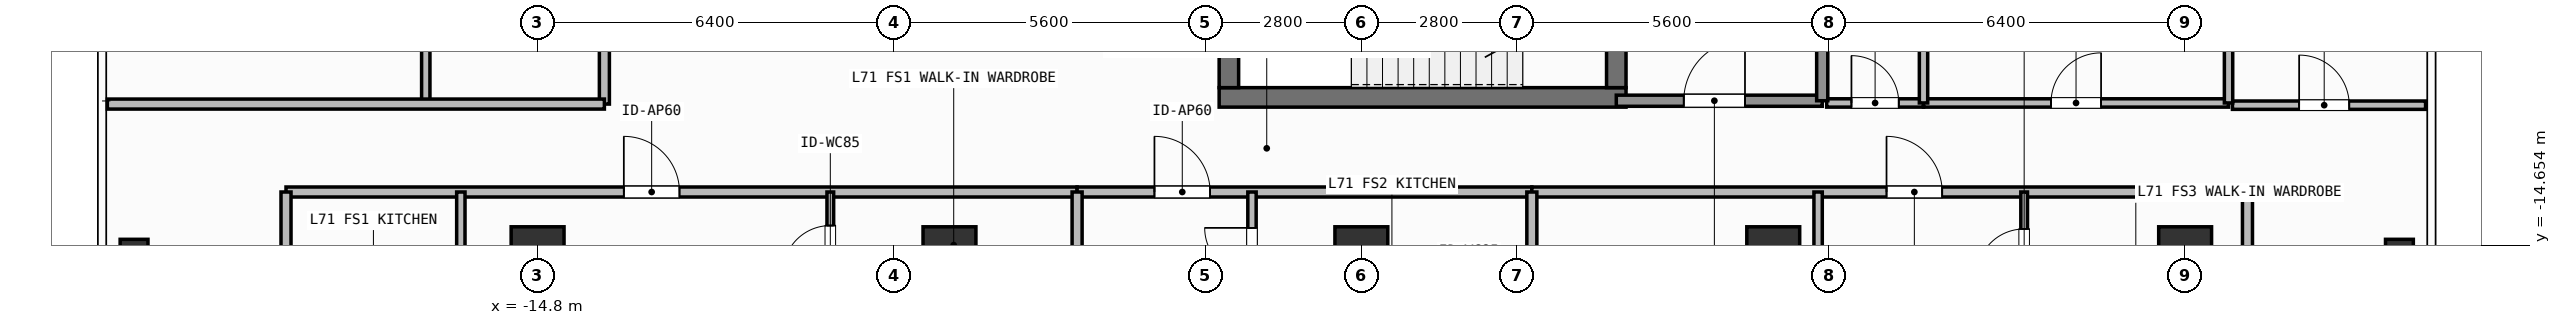
"""IFC4 building model, lengths in metres.
Left out: names, types, materials, properties, quantities, classifications, styles, units other than length and angle.
Written with IfcOpenShell. Run it as: python <this file> out.ifc"""

import sys

from ifc_helpers import new_model, si_unit, direction, frame, frame_2d, origin, origin_2d, place, context, subcontext, project, spatial, rectangle, hollow_rectangle, extrude, element, fill, save


model = new_model("IFC4")
c1 = context("Model", 3, precision=1e-05, world=origin(), true_north=direction((0.0, 1.0)))
c2 = subcontext(c1, "Body", "Model", "MODEL_VIEW")
j1 = project(units=[si_unit("LENGTHUNIT", "METRE"), si_unit("PLANEANGLEUNIT", "RADIAN")], contexts=[c1])
p1 = place(None, origin())
s1 = spatial("IfcSite", under=j1, at=p1, CompositionType="ELEMENT")
p2 = place(p1, origin())
s2 = spatial("IfcBuilding", under=s1, at=p2, CompositionType="ELEMENT")
p3 = place(p2, frame((0.0, 0.0, 289.8)))
s3 = spatial("IfcBuildingStorey", under=s2, at=p3, CompositionType="ELEMENT", Elevation=289.8)
p4 = place(p3, frame((-2.555, -12.0, 0.0), z_axis=(0.0, 0.0, 1.0), x_axis=(1.0, 0.0, 0.0)))
e1 = element("IfcWall", 1, at=p4, inside=s3, PredefinedType="SHEAR", context=c2, shape_type="SweptSolid", body=[
    extrude(rectangle(XDim=7.31, YDim=0.35, at=frame_2d((3.655, 0.0))), origin(), (0.0, 0.0, 1.0), 3.9),
])
p5 = place(p3, frame((-2.38, -11.825, 0.0), z_axis=(0.0, 0.0, 1.0), x_axis=(0.0, 1.0, 0.0)))
e2 = element("IfcWall", 2, at=p5, inside=s3, PredefinedType="SHEAR", context=c2, shape_type="SweptSolid", body=[
    extrude(rectangle(XDim=2.925, YDim=0.35, at=frame_2d((1.462, 0.0))), origin(), (0.0, 0.0, 1.0), 3.9),
])
p6 = place(p3, frame((4.58, -8.9, 0.0), z_axis=(0.0, 0.0, 1.0), x_axis=(0.0, -1.0, 0.0)))
e3 = element("IfcWall", 3, at=p6, inside=s3, PredefinedType="SHEAR", context=c2, shape_type="SweptSolid", body=[
    extrude(rectangle(XDim=2.925, YDim=0.35, at=frame_2d((1.462, 0.0))), origin(), (0.0, 0.0, 1.0), 3.9),
])
p7 = place(p6, frame((0.913, 0.0, 0.0)))
e4 = element("IfcOpeningElement", 4, at=p7, cuts=e3, PredefinedType="OPENING", context=c2, shape_type="SweptSolid", body=[
    extrude(rectangle(XDim=1.1, YDim=2.15, at=frame_2d((0.55, 1.075))), frame((0.0, 0.185, 0.0), z_axis=(0.0, -1.0, 0.0), x_axis=(1.0, 0.0, 0.0)), (0.0, 0.0, 1.0), 0.37),
])
for number, where, z_axis, x_axis in (
    (5, (-14.8, -14.8, 0.0), (0.0, 0.0, 1.0), (1.0, 0.0, 0.0)),
    (6, (-7.4, -14.8, 0.0), (0.0, 0.0, 1.0), (1.0, 0.0, 0.0)),
    (7, (0.0, -14.8, 0.0), (0.0, 0.0, 1.0), (1.0, 0.0, 0.0)),
    (8, (7.4, -14.8, 0.0), (0.0, 0.0, 1.0), (1.0, 0.0, 0.0)),
    (9, (14.8, -14.8, 0.0), (0.0, 0.0, 1.0), (1.0, 0.0, 0.0)),
):
    element("IfcColumn", number, at=place(p3, frame(where, z_axis=z_axis, x_axis=x_axis)), inside=s3, PredefinedType="COLUMN", context=c2, shape_type="SweptSolid", body=[
        extrude(rectangle(XDim=0.95, YDim=0.95, at=origin_2d()), origin(), (0.0, 0.0, 1.0), 3.9),
    ])
for number, where, z_axis, x_axis in (
    (10, (-22.05, -14.8, 0.0), (0.0, 0.0, 1.0), (1.0, 0.0, 0.0)),
    (11, (18.65, -14.8, 0.0), (0.0, 0.0, 1.0), (1.0, 0.0, 0.0)),
):
    element("IfcColumn", number, at=place(p3, frame(where, z_axis=z_axis, x_axis=x_axis)), inside=s3, PredefinedType="COLUMN", context=c2, shape_type="SweptSolid", body=[
        extrude(hollow_rectangle(XDim=0.5, YDim=0.5, WallThickness=0.025, at=origin_2d()), origin(), (0.0, 0.0, 1.0), 3.9),
    ])
p8 = place(p3, frame((4.58, -12.06, 0.0), z_axis=(0.0, 0.0, 1.0), x_axis=(1.0, 0.0, 0.0)))
e12 = element("IfcWall", 12, at=p8, inside=s3, PredefinedType="SOLIDWALL", context=c2, shape_type="SweptSolid", body=[
    extrude(rectangle(XDim=3.7, YDim=0.2, at=frame_2d((1.85, 0.0))), origin(), (0.0, 0.0, 1.0), 3.68),
])
p9 = place(p8, frame((1.212, 0.0, 0.0)))
e13 = element("IfcOpeningElement", 13, at=p9, cuts=e12, PredefinedType="OPENING", context=c2, shape_type="SweptSolid", body=[
    extrude(rectangle(XDim=1.1, YDim=2.15, at=frame_2d((0.55, 1.075))), frame((0.0, 0.11, 0.0), z_axis=(0.0, -1.0, 0.0), x_axis=(1.0, 0.0, 0.0)), (0.0, 0.0, 1.0), 0.22),
])
p10 = place(p3, frame((8.36, -12.1, 0.0), z_axis=(0.0, 0.0, 1.0), x_axis=(1.0, 0.0, 0.0)))
e14 = element("IfcWall", 14, at=p10, inside=s3, PredefinedType="PARTITIONING", context=c2, shape_type="SweptSolid", body=[
    extrude(rectangle(XDim=1.74, YDim=0.15, at=frame_2d((0.87, 0.0))), origin(), (0.0, 0.0, 1.0), 3.68),
])
p11 = place(p10, frame((0.445, 0.0, 0.0)))
e15 = element("IfcOpeningElement", 15, at=p11, cuts=e14, PredefinedType="OPENING", context=c2, shape_type="SweptSolid", body=[
    extrude(rectangle(XDim=0.85, YDim=2.1, at=frame_2d((0.425, 1.05))), frame((0.0, 0.085, 0.0), z_axis=(0.0, -1.0, 0.0), x_axis=(1.0, 0.0, 0.0)), (0.0, 0.0, 1.0), 0.17),
])
p12 = place(p3, frame((10.1, -12.1, 0.0), z_axis=(0.0, 0.0, 1.0), x_axis=(1.0, 0.0, 0.0)))
e16 = element("IfcWall", 16, at=p12, inside=s3, PredefinedType="PARTITIONING", context=c2, shape_type="SweptSolid", body=[
    extrude(rectangle(XDim=5.48, YDim=0.15, at=frame_2d((2.74, 0.0))), origin(), (0.0, 0.0, 1.0), 3.68),
])
p13 = place(p12, frame((2.29, 0.0, 0.0)))
e17 = element("IfcOpeningElement", 17, at=p13, cuts=e16, PredefinedType="OPENING", context=c2, shape_type="SweptSolid", body=[
    extrude(rectangle(XDim=0.9, YDim=2.1, at=frame_2d((0.45, 1.05))), frame((0.0, 0.085, 0.0), z_axis=(0.0, -1.0, 0.0), x_axis=(1.0, 0.0, 0.0)), (0.0, 0.0, 1.0), 0.17),
])
p14 = place(p3, frame((-19.32, -13.7, 0.0), z_axis=(0.0, 0.0, 1.0), x_axis=(1.0, 0.0, 0.0)))
e18 = element("IfcWall", 18, at=p14, inside=s3, PredefinedType="PARTITIONING", context=c2, shape_type="SweptSolid", body=[
    extrude(rectangle(XDim=14.213, YDim=0.18, at=frame_2d((7.106, 0.0))), origin(), (0.0, 0.0, 1.0), 3.68),
])
p15 = place(p14, frame((6.069, 0.0, 0.0)))
e19 = element("IfcOpeningElement", 19, at=p15, cuts=e18, PredefinedType="OPENING", context=c2, shape_type="SweptSolid", body=[
    extrude(rectangle(XDim=1.0, YDim=2.2, at=frame_2d((0.5, 1.1))), frame((0.0, 0.1, 0.0), z_axis=(0.0, -1.0, 0.0), x_axis=(1.0, 0.0, 0.0)), (0.0, 0.0, 1.0), 0.2),
])
p16 = place(p3, frame((-16.179, -17.108, 0.0), z_axis=(0.0, 0.0, 1.0), x_axis=(0.0, 1.0, 0.0)))
e20 = element("IfcWall", 20, at=p16, inside=s3, PredefinedType="PARTITIONING", context=c2, shape_type="SweptSolid", body=[
    extrude(rectangle(XDim=3.408, YDim=0.15, at=frame_2d((1.704, 0.0))), origin(), (0.0, 0.0, 1.0), 3.68),
])
p17 = place(p16, frame((0.849, 0.0, 0.0)))
e21 = element("IfcOpeningElement", 21, at=p17, cuts=e20, PredefinedType="OPENING", context=c2, shape_type="SweptSolid", body=[
    extrude(rectangle(XDim=0.85, YDim=2.1, at=frame_2d((0.425, 1.05))), frame((0.0, 0.085, 0.0), z_axis=(0.0, -1.0, 0.0), x_axis=(1.0, 0.0, 0.0)), (0.0, 0.0, 1.0), 0.17),
])
p18 = place(p3, frame((-9.541, -15.608, 0.0), z_axis=(0.0, 0.0, 1.0), x_axis=(0.0, 1.0, 0.0)))
e22 = element("IfcWall", 22, at=p18, inside=s3, PredefinedType="PARTITIONING", context=c2, shape_type="SweptSolid", body=[
    extrude(rectangle(XDim=1.908, YDim=0.12, at=frame_2d((0.954, 0.0))), origin(), (0.0, 0.0, 1.0), 3.68),
])
p19 = place(p18, frame((0.455, 0.0, 0.0)))
e23 = element("IfcOpeningElement", 23, at=p19, cuts=e22, PredefinedType="OPENING", context=c2, shape_type="SweptSolid", body=[
    extrude(rectangle(XDim=0.85, YDim=2.1, at=frame_2d((0.425, 1.05))), frame((0.0, 0.07, 0.0), z_axis=(0.0, -1.0, 0.0), x_axis=(1.0, 0.0, 0.0)), (0.0, 0.0, 1.0), 0.14),
])
p20 = place(p3, frame((-5.107, -13.7, 0.0), z_axis=(0.0, 0.0, 1.0), x_axis=(1.0, 0.0, 0.0)))
e24 = element("IfcWall", 24, at=p20, inside=s3, PredefinedType="PARTITIONING", context=c2, shape_type="SweptSolid", body=[
    extrude(rectangle(XDim=8.17, YDim=0.18, at=frame_2d((4.085, 0.0))), origin(), (0.0, 0.0, 1.0), 3.68),
])
p21 = place(p20, frame((1.389, 0.0, 0.0)))
e25 = element("IfcOpeningElement", 25, at=p21, cuts=e24, PredefinedType="OPENING", context=c2, shape_type="SweptSolid", body=[
    extrude(rectangle(XDim=1.0, YDim=2.2, at=frame_2d((0.5, 1.1))), frame((0.0, 0.1, 0.0), z_axis=(0.0, -1.0, 0.0), x_axis=(1.0, 0.0, 0.0)), (0.0, 0.0, 1.0), 0.2),
])
p22 = place(p3, frame((-1.965, -15.839, 0.0), z_axis=(0.0, 0.0, 1.0), x_axis=(0.0, 1.0, 0.0)))
e26 = element("IfcWall", 26, at=p22, inside=s3, PredefinedType="PARTITIONING", context=c2, shape_type="SweptSolid", body=[
    extrude(rectangle(XDim=2.139, YDim=0.15, at=frame_2d((1.07, 0.0))), origin(), (0.0, 0.0, 1.0), 3.68),
])
p23 = place(p22, frame((0.645, 0.0, 0.0)))
e27 = element("IfcOpeningElement", 27, at=p23, cuts=e26, PredefinedType="OPENING", context=c2, shape_type="SweptSolid", body=[
    extrude(rectangle(XDim=0.85, YDim=2.1, at=frame_2d((0.425, 1.05))), frame((0.0, 0.085, 0.0), z_axis=(0.0, -1.0, 0.0), x_axis=(1.0, 0.0, 0.0)), (0.0, 0.0, 1.0), 0.17),
])
p24 = place(p3, frame((3.063, -13.7, 0.0), z_axis=(0.0, 0.0, 1.0), x_axis=(1.0, 0.0, 0.0)))
e28 = element("IfcWall", 28, at=p24, inside=s3, PredefinedType="PARTITIONING", context=c2, shape_type="SweptSolid", body=[
    extrude(rectangle(XDim=12.857, YDim=0.18, at=frame_2d((6.428, 0.0))), origin(), (0.0, 0.0, 1.0), 3.68),
])
p25 = place(p24, frame((6.372, 0.0, 0.0)))
e29 = element("IfcOpeningElement", 29, at=p25, cuts=e28, PredefinedType="OPENING", context=c2, shape_type="SweptSolid", body=[
    extrude(rectangle(XDim=1.0, YDim=2.2, at=frame_2d((0.5, 1.1))), frame((0.0, 0.1, 0.0), z_axis=(0.0, -1.0, 0.0), x_axis=(1.0, 0.0, 0.0)), (0.0, 0.0, 1.0), 0.2),
])
p26 = place(p3, frame((8.206, -17.59, 0.0), z_axis=(0.0, 0.0, 1.0), x_axis=(0.0, 1.0, 0.0)))
e30 = element("IfcWall", 30, at=p26, inside=s3, PredefinedType="PARTITIONING", context=c2, shape_type="SweptSolid", body=[
    extrude(rectangle(XDim=3.89, YDim=0.15, at=frame_2d((1.945, 0.0))), origin(), (0.0, 0.0, 1.0), 3.68),
])
p27 = place(p26, frame((1.35, 0.0, 0.0)))
e31 = element("IfcOpeningElement", 31, at=p27, cuts=e30, PredefinedType="OPENING", context=c2, shape_type="SweptSolid", body=[
    extrude(rectangle(XDim=0.85, YDim=2.1, at=frame_2d((0.425, 1.05))), frame((0.0, 0.085, 0.0), z_axis=(0.0, -1.0, 0.0), x_axis=(1.0, 0.0, 0.0)), (0.0, 0.0, 1.0), 0.17),
])
p28 = place(p3, frame((11.908, -15.878, 0.0), z_axis=(0.0, 0.0, 1.0), x_axis=(0.0, 1.0, 0.0)))
e32 = element("IfcWall", 32, at=p28, inside=s3, PredefinedType="PARTITIONING", context=c2, shape_type="SweptSolid", body=[
    extrude(rectangle(XDim=2.178, YDim=0.12, at=frame_2d((1.089, 0.0))), origin(), (0.0, 0.0, 1.0), 3.68),
])
p29 = place(p28, frame((0.664, 0.0, 0.0)))
e33 = element("IfcOpeningElement", 33, at=p29, cuts=e32, PredefinedType="OPENING", context=c2, shape_type="SweptSolid", body=[
    extrude(rectangle(XDim=0.85, YDim=2.1, at=frame_2d((0.425, 1.05))), frame((0.0, 0.07, 0.0), z_axis=(0.0, -1.0, 0.0), x_axis=(1.0, 0.0, 0.0)), (0.0, 0.0, 1.0), 0.14),
])
p30 = place(p3, frame((-13.6, -12.12, 0.0), z_axis=(0.0, 0.0, 1.0), x_axis=(0.0, 1.0, 0.0)))
e34 = element("IfcWall", 34, at=p30, inside=s3, PredefinedType="PARTITIONING", context=c2, shape_type="SweptSolid", body=[
    extrude(rectangle(XDim=10.956, YDim=0.18, at=frame_2d((5.478, 0.0))), origin(), (0.0, 0.0, 1.0), 3.68),
])
p31 = place(p30, frame((5.335, 0.0, 0.0)))
e35 = element("IfcOpeningElement", 35, at=p31, cuts=e34, PredefinedType="OPENING", context=c2, shape_type="SweptSolid", body=[
    extrude(rectangle(XDim=1.0, YDim=2.2, at=frame_2d((0.5, 1.1))), frame((0.0, 0.1, 0.0), z_axis=(0.0, -1.0, 0.0), x_axis=(1.0, 0.0, 0.0)), (0.0, 0.0, 1.0), 0.2),
])
p32 = place(p3, frame((15.65, -12.14, 0.0), z_axis=(0.0, 0.0, 1.0), x_axis=(1.0, 0.0, 0.0)))
e36 = element("IfcWall", 36, at=p32, inside=s3, PredefinedType="PARTITIONING", context=c2, shape_type="SweptSolid", body=[
    extrude(rectangle(XDim=3.47, YDim=0.15, at=frame_2d((1.735, 0.0))), origin(), (0.0, 0.0, 1.0), 3.68),
])
p33 = place(p32, frame((1.198, 0.0, 0.0)))
e37 = element("IfcOpeningElement", 37, at=p33, cuts=e36, PredefinedType="OPENING", context=c2, shape_type="SweptSolid", body=[
    extrude(rectangle(XDim=0.9, YDim=2.1, at=frame_2d((0.45, 1.05))), frame((0.0, 0.085, 0.0), z_axis=(0.0, -1.0, 0.0), x_axis=(1.0, 0.0, 0.0)), (0.0, 0.0, 1.0), 0.17),
])
p34 = place(p3, frame((8.28, -12.06, 0.0), z_axis=(0.0, 0.0, 1.0), x_axis=(0.0, 1.0, 0.0)))
e38 = element("IfcWall", 38, at=p34, inside=s3, PredefinedType="SOLIDWALL", context=c2, shape_type="SweptSolid", body=[
    extrude(rectangle(XDim=3.335, YDim=0.2, at=frame_2d((1.667, 0.0))), origin(), (0.0, 0.0, 1.0), 3.68),
])
p35 = place(p3, frame((10.1, -12.1, 0.0), z_axis=(0.0, 0.0, 1.0), x_axis=(0.0, 1.0, 0.0)))
e39 = element("IfcWall", 39, at=p35, inside=s3, PredefinedType="PARTITIONING", context=c2, shape_type="SweptSolid", body=[
    extrude(rectangle(XDim=2.35, YDim=0.15, at=frame_2d((1.175, 0.0))), origin(), (0.0, 0.0, 1.0), 3.68),
])
p36 = place(p3, frame((15.58, -12.1, 0.0), z_axis=(0.0, 0.0, 1.0), x_axis=(0.0, 1.0, 0.0)))
e40 = element("IfcWall", 40, at=p36, inside=s3, PredefinedType="PARTITIONING", context=c2, shape_type="SweptSolid", body=[
    extrude(rectangle(XDim=6.25, YDim=0.15, at=frame_2d((3.125, 0.0))), origin(), (0.0, 0.0, 1.0), 3.68),
])
for number, where, z_axis, x_axis in (
    (41, (-19.32, -19.51, 0.0), (0.0, 0.0, 1.0), (0.0, 1.0, 0.0)),
    (42, (15.92, -19.51, 0.0), (0.0, 0.0, 1.0), (0.0, 1.0, 0.0)),
):
    element("IfcWall", number, at=place(p3, frame(where, z_axis=z_axis, x_axis=x_axis)), inside=s3, PredefinedType="PARTITIONING", context=c2, shape_type="SweptSolid", body=[
        extrude(rectangle(XDim=5.81, YDim=0.18, at=frame_2d((2.905, 0.0))), origin(), (0.0, 0.0, 1.0), 3.68),
    ])
for number, where, z_axis, x_axis in (
    (43, (-5.107, -20.63, 0.0), (0.0, 0.0, 1.0), (0.0, 1.0, 0.0)),
    (44, (3.063, -20.63, 0.0), (0.0, 0.0, 1.0), (0.0, 1.0, 0.0)),
):
    element("IfcWall", number, at=place(p3, frame(where, z_axis=z_axis, x_axis=x_axis)), inside=s3, PredefinedType="PARTITIONING", context=c2, shape_type="SweptSolid", body=[
        extrude(rectangle(XDim=6.93, YDim=0.18, at=frame_2d((3.465, 0.0))), origin(), (0.0, 0.0, 1.0), 3.68),
    ])
p37 = place(p3, frame((-16.809, -12.12, 0.0), z_axis=(0.0, 0.0, 1.0), x_axis=(0.0, 1.0, 0.0)))
e45 = element("IfcWall", 45, at=p37, inside=s3, PredefinedType="PARTITIONING", context=c2, shape_type="SweptSolid", body=[
    extrude(rectangle(XDim=2.8, YDim=0.15, at=frame_2d((1.4, 0.0))), origin(), (0.0, 0.0, 1.0), 3.68),
])
p38 = place(p3, frame((-22.53, -12.12, 0.0), z_axis=(0.0, 0.0, 1.0), x_axis=(1.0, 0.0, 0.0)))
e46 = element("IfcWall", 46, at=p38, inside=s3, PredefinedType="PARTITIONING", context=c2, shape_type="SweptSolid", body=[
    extrude(rectangle(XDim=8.93, YDim=0.18, at=frame_2d((4.465, 0.0))), origin(), (0.0, 0.0, 1.0), 3.68),
])
p39 = place(p9, origin())
e47 = element("IfcDoor", 47, at=p39, inside=s3, OperationType="SINGLE_SWING_RIGHT", PredefinedType="DOOR", context=c2, shape_type="SweptSolid", body=[
    extrude(rectangle(XDim=1.1, YDim=2.15, at=frame_2d((0.55, 1.075))), frame((0.0, 0.025, 0.0), z_axis=(0.0, -1.0, 0.0), x_axis=(1.0, 0.0, 0.0)), (0.0, 0.0, 1.0), 0.05),
])
fill(e13, e47)
p40 = place(p11, origin())
e48 = element("IfcDoor", 48, at=p40, inside=s3, OperationType="SINGLE_SWING_LEFT", PredefinedType="DOOR", context=c2, shape_type="SweptSolid", body=[
    extrude(rectangle(XDim=0.85, YDim=2.1, at=frame_2d((0.425, 1.05))), frame((0.0, 0.025, 0.0), z_axis=(0.0, -1.0, 0.0), x_axis=(1.0, 0.0, 0.0)), (0.0, 0.0, 1.0), 0.05),
])
fill(e15, e48)
p41 = place(p13, origin())
e49 = element("IfcDoor", 49, at=p41, inside=s3, OperationType="SINGLE_SWING_RIGHT", PredefinedType="DOOR", context=c2, shape_type="SweptSolid", body=[
    extrude(rectangle(XDim=0.9, YDim=2.1, at=frame_2d((0.45, 1.05))), frame((0.0, 0.025, 0.0), z_axis=(0.0, -1.0, 0.0), x_axis=(1.0, 0.0, 0.0)), (0.0, 0.0, 1.0), 0.05),
])
fill(e17, e49)
p42 = place(p15, origin())
e50 = element("IfcDoor", 50, at=p42, inside=s3, OperationType="SINGLE_SWING_LEFT", PredefinedType="DOOR", context=c2, shape_type="SweptSolid", body=[
    extrude(rectangle(XDim=1.0, YDim=2.2, at=frame_2d((0.5, 1.1))), frame((0.0, 0.025, 0.0), z_axis=(0.0, -1.0, 0.0), x_axis=(1.0, 0.0, 0.0)), (0.0, 0.0, 1.0), 0.05),
])
fill(e19, e50)
p43 = place(p19, origin())
e51 = element("IfcDoor", 51, at=p43, inside=s3, OperationType="SINGLE_SWING_LEFT", PredefinedType="DOOR", context=c2, shape_type="SweptSolid", body=[
    extrude(rectangle(XDim=0.85, YDim=2.1, at=frame_2d((0.425, 1.05))), frame((0.0, 0.025, 0.0), z_axis=(0.0, -1.0, 0.0), x_axis=(1.0, 0.0, 0.0)), (0.0, 0.0, 1.0), 0.05),
])
fill(e23, e51)
p44 = place(p21, origin())
e52 = element("IfcDoor", 52, at=p44, inside=s3, OperationType="SINGLE_SWING_LEFT", PredefinedType="DOOR", context=c2, shape_type="SweptSolid", body=[
    extrude(rectangle(XDim=1.0, YDim=2.2, at=frame_2d((0.5, 1.1))), frame((0.0, 0.025, 0.0), z_axis=(0.0, -1.0, 0.0), x_axis=(1.0, 0.0, 0.0)), (0.0, 0.0, 1.0), 0.05),
])
fill(e25, e52)
p45 = place(p23, origin())
e53 = element("IfcDoor", 53, at=p45, inside=s3, OperationType="SINGLE_SWING_RIGHT", PredefinedType="DOOR", context=c2, shape_type="SweptSolid", body=[
    extrude(rectangle(XDim=0.85, YDim=2.1, at=frame_2d((0.425, 1.05))), frame((0.0, 0.025, 0.0), z_axis=(0.0, -1.0, 0.0), x_axis=(1.0, 0.0, 0.0)), (0.0, 0.0, 1.0), 0.05),
])
fill(e27, e53)
p46 = place(p25, origin())
e54 = element("IfcDoor", 54, at=p46, inside=s3, OperationType="SINGLE_SWING_LEFT", PredefinedType="DOOR", context=c2, shape_type="SweptSolid", body=[
    extrude(rectangle(XDim=1.0, YDim=2.2, at=frame_2d((0.5, 1.1))), frame((0.0, 0.025, 0.0), z_axis=(0.0, -1.0, 0.0), x_axis=(1.0, 0.0, 0.0)), (0.0, 0.0, 1.0), 0.05),
])
fill(e29, e54)
p47 = place(p29, origin())
e55 = element("IfcDoor", 55, at=p47, inside=s3, OperationType="SINGLE_SWING_LEFT", PredefinedType="DOOR", context=c2, shape_type="SweptSolid", body=[
    extrude(rectangle(XDim=0.85, YDim=2.1, at=frame_2d((0.425, 1.05))), frame((0.0, 0.025, 0.0), z_axis=(0.0, -1.0, 0.0), x_axis=(1.0, 0.0, 0.0)), (0.0, 0.0, 1.0), 0.05),
])
fill(e33, e55)
p48 = place(p33, origin())
e56 = element("IfcDoor", 56, at=p48, inside=s3, OperationType="SINGLE_SWING_LEFT", PredefinedType="DOOR", context=c2, shape_type="SweptSolid", body=[
    extrude(rectangle(XDim=0.9, YDim=2.1, at=frame_2d((0.45, 1.05))), frame((0.0, 0.025, 0.0), z_axis=(0.0, -1.0, 0.0), x_axis=(1.0, 0.0, 0.0)), (0.0, 0.0, 1.0), 0.05),
])
fill(e37, e56)
save(model, sys.argv[1])
